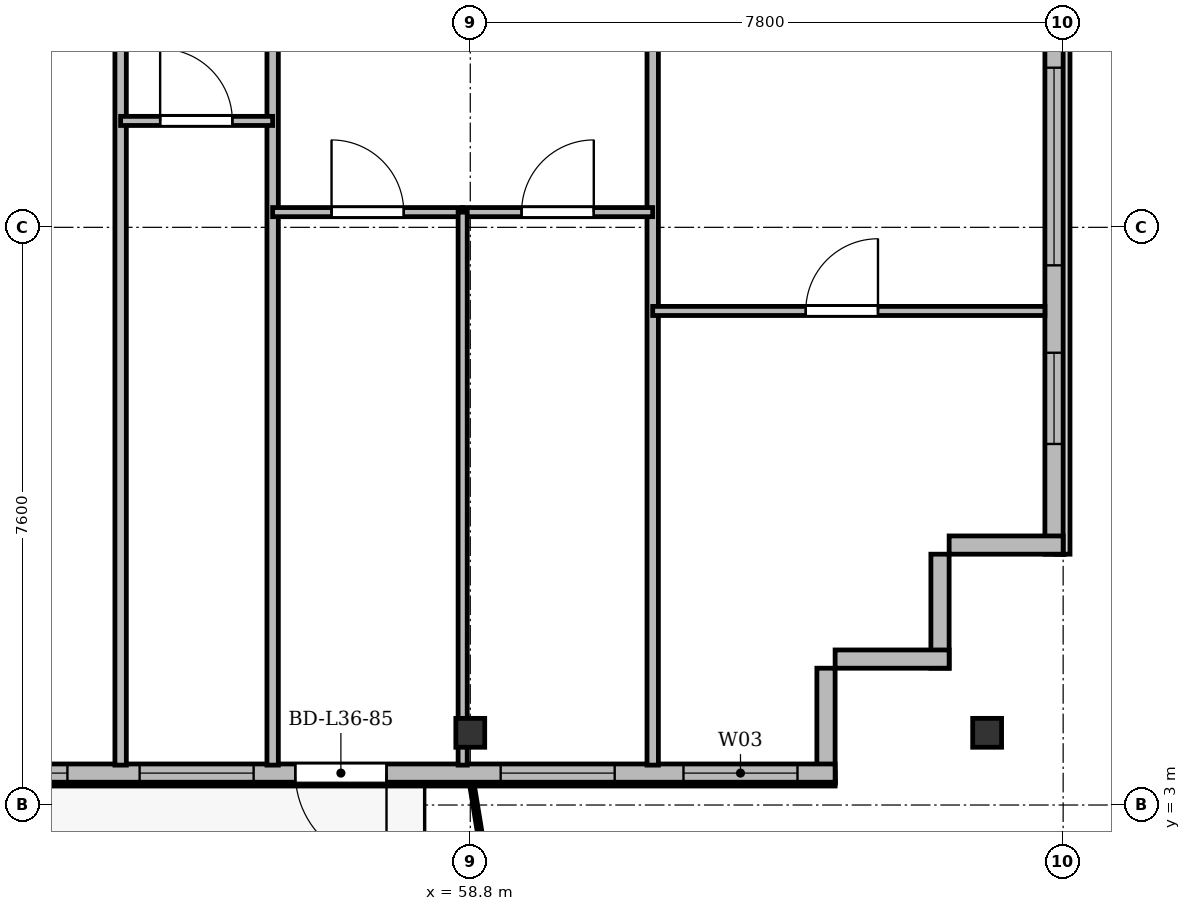
"""IFC4 building model, lengths in metres.
Left out: names, types, materials, properties, quantities, classifications, styles, units other than length and angle.
Written with IfcOpenShell. Run it as: python <this file> out.ifc"""

import sys

from ifc_helpers import new_model, si_unit, direction, frame, frame_2d, origin, origin_2d, place, context, subcontext, project, spatial, rectangle, i_section, extrude, source, transform, mapped, element, fill, save


model = new_model("IFC4")
c1 = context("Model", 3, precision=1e-05, world=origin(), true_north=direction((0.0, 1.0)))
c2 = subcontext(c1, "Body", "Model", "MODEL_VIEW")
j1 = project(units=[si_unit("LENGTHUNIT", "METRE"), si_unit("PLANEANGLEUNIT", "RADIAN")], contexts=[c1])
p1 = place(None, origin())
s1 = spatial("IfcSite", under=j1, at=p1, CompositionType="ELEMENT")
p2 = place(p1, origin())
s2 = spatial("IfcBuilding", under=s1, at=p2, CompositionType="ELEMENT")
p3 = place(p2, frame((0.0, 0.0, 139.3)))
s3 = spatial("IfcBuildingStorey", under=s2, at=p3, CompositionType="ELEMENT", Elevation=139.3)
m1 = source(origin(), c2, "Body", "SweptSolid", [
    extrude(i_section(OverallWidth=0.38, OverallDepth=0.38, WebThickness=0.02, FlangeThickness=0.03, at=origin_2d()), origin(), (0.0, 0.0, 1.0), 3.6),
])
for number, where, z_axis, x_axis in (
    (1, (58.8, 3.95, 0.0), (0.0, 0.0, 1.0), (1.0, 0.0, 0.0)),
    (2, (65.6, 3.95, 0.0), (0.0, 0.0, 1.0), (1.0, 0.0, 0.0)),
):
    element("IfcColumn", number, at=place(p3, frame(where, z_axis=z_axis, x_axis=x_axis)), inside=s3, PredefinedType="COLUMN", context=c2, shape_type="MappedRepresentation", body=[
        mapped(m1, transform((0.0, 0.0, 0.0), x_axis=(1.0, 0.0, 0.0), y_axis=(0.0, 1.0, 0.0), z_axis=(0.0, 0.0, 1.0), scale=1.0)),
    ])
p4 = place(p3, frame((66.48, 45.5, 0.0), z_axis=(0.0, 0.0, 1.0), x_axis=(0.0, -1.0, 0.0)))
e3 = element("IfcWall", 3, at=p4, inside=s3, PredefinedType="SOLIDWALL", context=c2, shape_type="SweptSolid", body=[
    extrude(rectangle(XDim=39.2, YDim=0.24, at=frame_2d((19.6, 0.0))), origin(), (0.0, 0.0, 1.0), 3.35),
])
p5 = place(p4, frame((36.55, 0.0, 0.92)))
e4 = element("IfcOpeningElement", 4, at=p5, cuts=e3, PredefinedType="OPENING", context=c2, shape_type="SweptSolid", body=[
    extrude(rectangle(XDim=1.2, YDim=1.65, at=frame_2d((0.6, 0.825))), frame((0.0, 0.13, 0.0), z_axis=(0.0, -1.0, 0.0), x_axis=(1.0, 0.0, 0.0)), (0.0, 0.0, 1.0), 0.26),
])
p6 = place(p4, frame((32.8, 0.0, 0.92)))
e5 = element("IfcOpeningElement", 5, at=p6, cuts=e3, PredefinedType="OPENING", context=c2, shape_type="SweptSolid", body=[
    extrude(rectangle(XDim=2.6, YDim=1.9, at=frame_2d((1.3, 0.95))), frame((0.0, 0.13, 0.0), z_axis=(0.0, -1.0, 0.0), x_axis=(1.0, 0.0, 0.0)), (0.0, 0.0, 1.0), 0.26),
])
p7 = place(p4, frame((28.6, 0.0, 0.92)))
e6 = element("IfcOpeningElement", 6, at=p7, cuts=e3, PredefinedType="OPENING", context=c2, shape_type="SweptSolid", body=[
    extrude(rectangle(XDim=2.6, YDim=1.9, at=frame_2d((1.3, 0.95))), frame((0.0, 0.13, 0.0), z_axis=(0.0, -1.0, 0.0), x_axis=(1.0, 0.0, 0.0)), (0.0, 0.0, 1.0), 0.26),
])
p8 = place(p4, frame((21.4, 0.0, 0.92)))
e7 = element("IfcOpeningElement", 7, at=p8, cuts=e3, PredefinedType="OPENING", context=c2, shape_type="SweptSolid", body=[
    extrude(rectangle(XDim=2.6, YDim=1.9, at=frame_2d((1.3, 0.95))), frame((0.0, 0.13, 0.0), z_axis=(0.0, -1.0, 0.0), x_axis=(1.0, 0.0, 0.0)), (0.0, 0.0, 1.0), 0.26),
])
p9 = place(p4, frame((7.4, 0.0, 0.92)))
e8 = element("IfcOpeningElement", 8, at=p9, cuts=e3, PredefinedType="OPENING", context=c2, shape_type="SweptSolid", body=[
    extrude(rectangle(XDim=2.6, YDim=1.9, at=frame_2d((1.3, 0.95))), frame((0.0, 0.13, 0.0), z_axis=(0.0, -1.0, 0.0), x_axis=(1.0, 0.0, 0.0)), (0.0, 0.0, 1.0), 0.26),
])
p10 = place(p4, frame((4.5, 0.0, 0.92)))
e9 = element("IfcOpeningElement", 9, at=p10, cuts=e3, PredefinedType="OPENING", context=c2, shape_type="SweptSolid", body=[
    extrude(rectangle(XDim=1.2, YDim=1.65, at=frame_2d((0.6, 0.825))), frame((0.0, 0.13, 0.0), z_axis=(0.0, -1.0, 0.0), x_axis=(1.0, 0.0, 0.0)), (0.0, 0.0, 1.0), 0.26),
])
p11 = place(p4, frame((1.15, 0.0, 0.92)))
e10 = element("IfcOpeningElement", 10, at=p11, cuts=e3, PredefinedType="OPENING", context=c2, shape_type="SweptSolid", body=[
    extrude(rectangle(XDim=1.2, YDim=1.65, at=frame_2d((0.6, 0.825))), frame((0.0, 0.13, 0.0), z_axis=(0.0, -1.0, 0.0), x_axis=(1.0, 0.0, 0.0)), (0.0, 0.0, 1.0), 0.26),
])
p12 = place(p3, frame((66.6, 6.42, 0.0), z_axis=(0.0, 0.0, 1.0), x_axis=(-1.0, 0.0, 0.0)))
e11 = element("IfcWall", 11, at=p12, inside=s3, PredefinedType="SOLIDWALL", context=c2, shape_type="SweptSolid", body=[
    extrude(rectangle(XDim=1.5, YDim=0.24, at=frame_2d((0.75, 0.0))), origin(), (0.0, 0.0, 1.0), 2.85),
])
for number, where, z_axis, x_axis in (
    (12, (64.98, 6.3, 0.0), (0.0, 0.0, 1.0), (0.0, -1.0, 0.0)),
    (13, (65.1, 4.92, 0.0), (0.0, 0.0, 1.0), (-1.0, 0.0, 0.0)),
):
    element("IfcWall", number, at=place(p3, frame(where, z_axis=z_axis, x_axis=x_axis)), inside=s3, PredefinedType="SOLIDWALL", context=c2, shape_type="SweptSolid", body=[
        extrude(rectangle(XDim=1.5, YDim=0.24, at=frame_2d((0.75, 0.0))), origin(), (0.0, 0.0, 1.0), 3.35),
    ])
p13 = place(p3, frame((63.48, 4.8, 0.0), z_axis=(0.0, 0.0, 1.0), x_axis=(0.0, -1.0, 0.0)))
e14 = element("IfcWall", 14, at=p13, inside=s3, PredefinedType="SOLIDWALL", context=c2, shape_type="SweptSolid", body=[
    extrude(rectangle(XDim=1.5, YDim=0.24, at=frame_2d((0.75, 0.0))), origin(), (0.0, 0.0, 1.0), 2.75),
])
p14 = place(p3, frame((63.6, 3.42, 0.0), z_axis=(0.0, 0.0, 1.0), x_axis=(-1.0, 0.0, 0.0)))
e15 = element("IfcWall", 15, at=p14, inside=s3, PredefinedType="SOLIDWALL", context=c2, shape_type="SweptSolid", body=[
    extrude(rectangle(XDim=52.8, YDim=0.24, at=frame_2d((26.4, 0.0))), origin(), (0.0, 0.0, 1.0), 3.35),
])
p15 = place(p14, frame((0.495, 0.0, 0.9)))
e16 = element("IfcOpeningElement", 16, at=p15, cuts=e15, PredefinedType="OPENING", context=c2, shape_type="SweptSolid", body=[
    extrude(rectangle(XDim=1.5, YDim=1.75, at=frame_2d((0.75, 0.875))), frame((0.0, 0.13, 0.0), z_axis=(0.0, -1.0, 0.0), x_axis=(1.0, 0.0, 0.0)), (0.0, 0.0, 1.0), 0.26),
])
p16 = place(p14, frame((2.9, 0.0, 0.9)))
e17 = element("IfcOpeningElement", 17, at=p16, cuts=e15, PredefinedType="OPENING", context=c2, shape_type="SweptSolid", body=[
    extrude(rectangle(XDim=1.5, YDim=1.75, at=frame_2d((0.75, 0.875))), frame((0.0, 0.13, 0.0), z_axis=(0.0, -1.0, 0.0), x_axis=(1.0, 0.0, 0.0)), (0.0, 0.0, 1.0), 0.26),
])
p17 = place(p14, frame((5.902, 0.0, 0.0)))
e18 = element("IfcOpeningElement", 18, at=p17, cuts=e15, PredefinedType="OPENING", context=c2, shape_type="SweptSolid", body=[
    extrude(rectangle(XDim=1.2, YDim=2.2, at=frame_2d((0.6, 1.1))), frame((0.0, 0.13, 0.0), z_axis=(0.0, -1.0, 0.0), x_axis=(1.0, 0.0, 0.0)), (0.0, 0.0, 1.0), 0.26),
])
p18 = place(p14, frame((7.65, 0.0, 0.9)))
e19 = element("IfcOpeningElement", 19, at=p18, cuts=e15, PredefinedType="OPENING", context=c2, shape_type="SweptSolid", body=[
    extrude(rectangle(XDim=1.5, YDim=1.75, at=frame_2d((0.75, 0.875))), frame((0.0, 0.13, 0.0), z_axis=(0.0, -1.0, 0.0), x_axis=(1.0, 0.0, 0.0)), (0.0, 0.0, 1.0), 0.26),
])
p19 = place(p14, frame((10.1, 0.0, 0.9)))
e20 = element("IfcOpeningElement", 20, at=p19, cuts=e15, PredefinedType="OPENING", context=c2, shape_type="SweptSolid", body=[
    extrude(rectangle(XDim=1.8, YDim=1.8, at=frame_2d((0.9, 0.9))), frame((0.0, 0.13, 0.0), z_axis=(0.0, -1.0, 0.0), x_axis=(1.0, 0.0, 0.0)), (0.0, 0.0, 1.0), 0.26),
])
p20 = place(p14, frame((13.05, 0.0, 0.9)))
e21 = element("IfcOpeningElement", 21, at=p20, cuts=e15, PredefinedType="OPENING", context=c2, shape_type="SweptSolid", body=[
    extrude(rectangle(XDim=1.5, YDim=1.75, at=frame_2d((0.75, 0.875))), frame((0.0, 0.13, 0.0), z_axis=(0.0, -1.0, 0.0), x_axis=(1.0, 0.0, 0.0)), (0.0, 0.0, 1.0), 0.26),
])
p21 = place(p14, frame((15.45, 0.0, 0.9)))
e22 = element("IfcOpeningElement", 22, at=p21, cuts=e15, PredefinedType="OPENING", context=c2, shape_type="SweptSolid", body=[
    extrude(rectangle(XDim=1.5, YDim=1.75, at=frame_2d((0.75, 0.875))), frame((0.0, 0.13, 0.0), z_axis=(0.0, -1.0, 0.0), x_axis=(1.0, 0.0, 0.0)), (0.0, 0.0, 1.0), 0.26),
])
p22 = place(p14, frame((17.6, 0.0, 0.9)))
e23 = element("IfcOpeningElement", 23, at=p22, cuts=e15, PredefinedType="OPENING", context=c2, shape_type="SweptSolid", body=[
    extrude(rectangle(XDim=2.0, YDim=1.95, at=frame_2d((1.0, 0.975))), frame((0.0, 0.13, 0.0), z_axis=(0.0, -1.0, 0.0), x_axis=(1.0, 0.0, 0.0)), (0.0, 0.0, 1.0), 0.26),
])
p23 = place(p14, frame((20.625, 0.0, 0.9)))
e24 = element("IfcOpeningElement", 24, at=p23, cuts=e15, PredefinedType="OPENING", context=c2, shape_type="SweptSolid", body=[
    extrude(rectangle(XDim=1.65, YDim=1.85, at=frame_2d((0.825, 0.925))), frame((0.0, 0.13, 0.0), z_axis=(0.0, -1.0, 0.0), x_axis=(1.0, 0.0, 0.0)), (0.0, 0.0, 1.0), 0.26),
])
p24 = place(p14, frame((23.85, 0.0, 0.9)))
e25 = element("IfcOpeningElement", 25, at=p24, cuts=e15, PredefinedType="OPENING", context=c2, shape_type="SweptSolid", body=[
    extrude(rectangle(XDim=1.8, YDim=1.8, at=frame_2d((0.9, 0.9))), frame((0.0, 0.13, 0.0), z_axis=(0.0, -1.0, 0.0), x_axis=(1.0, 0.0, 0.0)), (0.0, 0.0, 1.0), 0.26),
])
p25 = place(p14, frame((28.6, 0.0, 0.9)))
e26 = element("IfcOpeningElement", 26, at=p25, cuts=e15, PredefinedType="OPENING", context=c2, shape_type="SweptSolid", body=[
    extrude(rectangle(XDim=2.2, YDim=1.8, at=frame_2d((1.1, 0.9))), frame((0.0, 0.13, 0.0), z_axis=(0.0, -1.0, 0.0), x_axis=(1.0, 0.0, 0.0)), (0.0, 0.0, 1.0), 0.26),
])
p26 = place(p14, frame((34.478, 0.0, 0.0)))
e27 = element("IfcOpeningElement", 27, at=p26, cuts=e15, PredefinedType="OPENING", context=c2, shape_type="SweptSolid", body=[
    extrude(rectangle(XDim=1.2, YDim=2.2, at=frame_2d((0.6, 1.1))), frame((0.0, 0.13, 0.0), z_axis=(0.0, -1.0, 0.0), x_axis=(1.0, 0.0, 0.0)), (0.0, 0.0, 1.0), 0.26),
])
p27 = place(p14, frame((37.4, 0.0, 0.9)))
e28 = element("IfcOpeningElement", 28, at=p27, cuts=e15, PredefinedType="OPENING", context=c2, shape_type="SweptSolid", body=[
    extrude(rectangle(XDim=2.0, YDim=1.95, at=frame_2d((1.0, 0.975))), frame((0.0, 0.13, 0.0), z_axis=(0.0, -1.0, 0.0), x_axis=(1.0, 0.0, 0.0)), (0.0, 0.0, 1.0), 0.26),
])
p28 = place(p14, frame((40.975, 0.0, 0.9)))
e29 = element("IfcOpeningElement", 29, at=p28, cuts=e15, PredefinedType="OPENING", context=c2, shape_type="SweptSolid", body=[
    extrude(rectangle(XDim=1.65, YDim=1.85, at=frame_2d((0.825, 0.925))), frame((0.0, 0.13, 0.0), z_axis=(0.0, -1.0, 0.0), x_axis=(1.0, 0.0, 0.0)), (0.0, 0.0, 1.0), 0.26),
])
p29 = place(p14, frame((43.65, 0.0, 0.9)))
e30 = element("IfcOpeningElement", 30, at=p29, cuts=e15, PredefinedType="OPENING", context=c2, shape_type="SweptSolid", body=[
    extrude(rectangle(XDim=1.5, YDim=1.75, at=frame_2d((0.75, 0.875))), frame((0.0, 0.13, 0.0), z_axis=(0.0, -1.0, 0.0), x_axis=(1.0, 0.0, 0.0)), (0.0, 0.0, 1.0), 0.26),
])
p30 = place(p14, frame((45.85, 0.0, 0.9)))
e31 = element("IfcOpeningElement", 31, at=p30, cuts=e15, PredefinedType="OPENING", context=c2, shape_type="SweptSolid", body=[
    extrude(rectangle(XDim=1.5, YDim=1.75, at=frame_2d((0.75, 0.875))), frame((0.0, 0.13, 0.0), z_axis=(0.0, -1.0, 0.0), x_axis=(1.0, 0.0, 0.0)), (0.0, 0.0, 1.0), 0.26),
])
p31 = place(p14, frame((48.25, 0.0, 0.9)))
e32 = element("IfcOpeningElement", 32, at=p31, cuts=e15, PredefinedType="OPENING", context=c2, shape_type="SweptSolid", body=[
    extrude(rectangle(XDim=1.5, YDim=1.75, at=frame_2d((0.75, 0.875))), frame((0.0, 0.13, 0.0), z_axis=(0.0, -1.0, 0.0), x_axis=(1.0, 0.0, 0.0)), (0.0, 0.0, 1.0), 0.26),
])
p32 = place(p14, frame((50.455, 0.0, 0.9)))
e33 = element("IfcOpeningElement", 33, at=p32, cuts=e15, PredefinedType="OPENING", context=c2, shape_type="SweptSolid", body=[
    extrude(rectangle(XDim=2.0, YDim=1.95, at=frame_2d((1.0, 0.975))), frame((0.0, 0.13, 0.0), z_axis=(0.0, -1.0, 0.0), x_axis=(1.0, 0.0, 0.0)), (0.0, 0.0, 1.0), 0.26),
])
for number, where, z_axis, x_axis in (
    (34, (61.2, 3.525, 0.0), (0.0, 0.0, 1.0), (0.0, 1.0, 0.0)),
    (35, (54.2, 3.525, 0.0), (0.0, 0.0, 1.0), (0.0, 1.0, 0.0)),
    (36, (56.2, 3.525, 0.0), (0.0, 0.0, 1.0), (0.0, 1.0, 0.0)),
):
    element("IfcWall", number, at=place(p3, frame(where, z_axis=z_axis, x_axis=x_axis)), inside=s3, PredefinedType="PARTITIONING", context=c2, shape_type="SweptSolid", body=[
        extrude(rectangle(XDim=27.275, YDim=0.15, at=frame_2d((13.638, 0.0))), origin(), (0.0, 0.0, 1.0), 2.75),
    ])
p33 = place(p3, frame((54.2, 12.0, 0.0), z_axis=(0.0, 0.0, 1.0), x_axis=(1.0, 0.0, 0.0)))
e37 = element("IfcWall", 37, at=p33, inside=s3, PredefinedType="PARTITIONING", context=c2, shape_type="SweptSolid", body=[
    extrude(rectangle(XDim=2.0, YDim=0.12, at=frame_2d((1.0, 0.0))), origin(), (0.0, 0.0, 1.0), 3.35),
])
p34 = place(p33, frame((0.52, 0.0, 0.0)))
e38 = element("IfcOpeningElement", 38, at=p34, cuts=e37, PredefinedType="OPENING", context=c2, shape_type="SweptSolid", body=[
    extrude(rectangle(XDim=0.95, YDim=2.15, at=frame_2d((0.475, 1.075))), frame((0.0, 0.07, 0.0), z_axis=(0.0, -1.0, 0.0), x_axis=(1.0, 0.0, 0.0)), (0.0, 0.0, 1.0), 0.14),
])
p35 = place(p3, frame((56.2, 10.8, 0.0), z_axis=(0.0, 0.0, 1.0), x_axis=(1.0, 0.0, 0.0)))
e39 = element("IfcWall", 39, at=p35, inside=s3, PredefinedType="PARTITIONING", context=c2, shape_type="SweptSolid", body=[
    extrude(rectangle(XDim=2.5, YDim=0.12, at=frame_2d((1.25, 0.0))), origin(), (0.0, 0.0, 1.0), 3.0),
])
p36 = place(p35, frame((0.775, 0.0, 0.0)))
e40 = element("IfcOpeningElement", 40, at=p36, cuts=e39, PredefinedType="OPENING", context=c2, shape_type="SweptSolid", body=[
    extrude(rectangle(XDim=0.95, YDim=2.15, at=frame_2d((0.475, 1.075))), frame((0.0, 0.07, 0.0), z_axis=(0.0, -1.0, 0.0), x_axis=(1.0, 0.0, 0.0)), (0.0, 0.0, 1.0), 0.14),
])
p37 = place(p3, frame((58.7, 10.8, 0.0), z_axis=(0.0, 0.0, 1.0), x_axis=(1.0, 0.0, 0.0)))
e41 = element("IfcWall", 41, at=p37, inside=s3, PredefinedType="PARTITIONING", context=c2, shape_type="SweptSolid", body=[
    extrude(rectangle(XDim=2.5, YDim=0.12, at=frame_2d((1.25, 0.0))), origin(), (0.0, 0.0, 1.0), 2.85),
])
p38 = place(p37, frame((0.775, 0.0, 0.0)))
e42 = element("IfcOpeningElement", 42, at=p38, cuts=e41, PredefinedType="OPENING", context=c2, shape_type="SweptSolid", body=[
    extrude(rectangle(XDim=0.95, YDim=2.15, at=frame_2d((0.475, 1.075))), frame((0.0, 0.07, 0.0), z_axis=(0.0, -1.0, 0.0), x_axis=(1.0, 0.0, 0.0)), (0.0, 0.0, 1.0), 0.14),
])
p39 = place(p3, frame((58.7, 3.525, 0.0), z_axis=(0.0, 0.0, 1.0), x_axis=(0.0, 1.0, 0.0)))
e43 = element("IfcWall", 43, at=p39, inside=s3, PredefinedType="PARTITIONING", context=c2, shape_type="SweptSolid", body=[
    extrude(rectangle(XDim=7.275, YDim=0.12, at=frame_2d((3.638, 0.0))), origin(), (0.0, 0.0, 1.0), 2.75),
])
p40 = place(p3, frame((61.2, 9.5, 0.0), z_axis=(0.0, 0.0, 1.0), x_axis=(1.0, 0.0, 0.0)))
e44 = element("IfcWall", 44, at=p40, inside=s3, PredefinedType="PARTITIONING", context=c2, shape_type="SweptSolid", body=[
    extrude(rectangle(XDim=5.16, YDim=0.12, at=frame_2d((2.58, 0.0))), origin(), (0.0, 0.0, 1.0), 2.85),
])
p41 = place(p40, frame((2.014, 0.0, 0.0)))
e45 = element("IfcOpeningElement", 45, at=p41, cuts=e44, PredefinedType="OPENING", context=c2, shape_type="SweptSolid", body=[
    extrude(rectangle(XDim=0.95, YDim=2.15, at=frame_2d((0.475, 1.075))), frame((0.0, 0.07, 0.0), z_axis=(0.0, -1.0, 0.0), x_axis=(1.0, 0.0, 0.0)), (0.0, 0.0, 1.0), 0.14),
])
m2 = source(origin(), c2, "Body", "SweptSolid", [
    extrude(rectangle(XDim=1.2, YDim=1.65, at=frame_2d((0.6, 0.825))), frame((0.0, 0.03, 0.0), z_axis=(0.0, -1.0, 0.0), x_axis=(1.0, 0.0, 0.0)), (0.0, 0.0, 1.0), 0.06),
])
p42 = place(p5, origin())
e46 = element("IfcWindow", 46, at=p42, inside=s3, PartitioningType="SINGLE_PANEL", PredefinedType="WINDOW", context=c2, shape_type="MappedRepresentation", body=[
    mapped(m2, transform((0.0, 0.0, 0.0), x_axis=(1.0, 0.0, 0.0), y_axis=(0.0, 1.0, 0.0), z_axis=(0.0, 0.0, 1.0), scale=1.0)),
])
fill(e4, e46)
m3 = source(origin(), c2, "Body", "SweptSolid", [
    extrude(rectangle(XDim=2.6, YDim=1.9, at=frame_2d((1.3, 0.95))), frame((0.0, 0.03, 0.0), z_axis=(0.0, -1.0, 0.0), x_axis=(1.0, 0.0, 0.0)), (0.0, 0.0, 1.0), 0.06),
])
p43 = place(p6, origin())
e47 = element("IfcWindow", 47, at=p43, inside=s3, PartitioningType="SINGLE_PANEL", PredefinedType="WINDOW", context=c2, shape_type="MappedRepresentation", body=[
    mapped(m3, transform((0.0, 0.0, 0.0), x_axis=(1.0, 0.0, 0.0), y_axis=(0.0, 1.0, 0.0), z_axis=(0.0, 0.0, 1.0), scale=1.0)),
])
fill(e5, e47)
m4 = source(origin(), c2, "Body", "SweptSolid", [
    extrude(rectangle(XDim=1.5, YDim=1.75, at=frame_2d((0.75, 0.875))), frame((0.0, 0.03, 0.0), z_axis=(0.0, -1.0, 0.0), x_axis=(1.0, 0.0, 0.0)), (0.0, 0.0, 1.0), 0.06),
])
p44 = place(p15, origin())
e48 = element("IfcWindow", 48, at=p44, inside=s3, PartitioningType="SINGLE_PANEL", PredefinedType="WINDOW", context=c2, shape_type="MappedRepresentation", body=[
    mapped(m4, transform((0.0, 0.0, 0.0), x_axis=(1.0, 0.0, 0.0), y_axis=(0.0, 1.0, 0.0), z_axis=(0.0, 0.0, 1.0), scale=1.0)),
])
fill(e16, e48)
p45 = place(p16, origin())
e49 = element("IfcWindow", 49, at=p45, inside=s3, PartitioningType="SINGLE_PANEL", PredefinedType="WINDOW", context=c2, shape_type="MappedRepresentation", body=[
    mapped(m4, transform((0.0, 0.0, 0.0), x_axis=(1.0, 0.0, 0.0), y_axis=(0.0, 1.0, 0.0), z_axis=(0.0, 0.0, 1.0), scale=1.0)),
])
fill(e17, e49)
m5 = source(origin(), c2, "Body", "SweptSolid", [
    extrude(rectangle(XDim=1.2, YDim=2.2, at=frame_2d((0.6, 1.1))), frame((0.0, 0.025, 0.0), z_axis=(0.0, -1.0, 0.0), x_axis=(1.0, 0.0, 0.0)), (0.0, 0.0, 1.0), 0.05),
])
p46 = place(p17, origin())
e50 = element("IfcDoor", 50, at=p46, inside=s3, OperationType="SINGLE_SWING_LEFT", PredefinedType="DOOR", context=c2, shape_type="MappedRepresentation", body=[
    mapped(m5, transform((0.0, 0.0, 0.0), x_axis=(1.0, 0.0, 0.0), y_axis=(0.0, 1.0, 0.0), z_axis=(0.0, 0.0, 1.0), scale=1.0)),
])
fill(e18, e50)
p47 = place(p18, origin())
e51 = element("IfcWindow", 51, at=p47, inside=s3, PartitioningType="SINGLE_PANEL", PredefinedType="WINDOW", context=c2, shape_type="MappedRepresentation", body=[
    mapped(m4, transform((0.0, 0.0, 0.0), x_axis=(1.0, 0.0, 0.0), y_axis=(0.0, 1.0, 0.0), z_axis=(0.0, 0.0, 1.0), scale=1.0)),
])
fill(e19, e51)
m6 = source(origin(), c2, "Body", "SweptSolid", [
    extrude(rectangle(XDim=1.8, YDim=1.8, at=frame_2d((0.9, 0.9))), frame((0.0, 0.03, 0.0), z_axis=(0.0, -1.0, 0.0), x_axis=(1.0, 0.0, 0.0)), (0.0, 0.0, 1.0), 0.06),
])
p48 = place(p19, origin())
e52 = element("IfcWindow", 52, at=p48, inside=s3, PartitioningType="SINGLE_PANEL", PredefinedType="WINDOW", context=c2, shape_type="MappedRepresentation", body=[
    mapped(m6, transform((0.0, 0.0, 0.0), x_axis=(1.0, 0.0, 0.0), y_axis=(0.0, 1.0, 0.0), z_axis=(0.0, 0.0, 1.0), scale=1.0)),
])
fill(e20, e52)
m7 = source(origin(), c2, "Body", "SweptSolid", [
    extrude(rectangle(XDim=0.95, YDim=2.15, at=frame_2d((0.475, 1.075))), frame((0.0, 0.025, 0.0), z_axis=(0.0, -1.0, 0.0), x_axis=(1.0, 0.0, 0.0)), (0.0, 0.0, 1.0), 0.05),
])
p49 = place(p34, origin())
e53 = element("IfcDoor", 53, at=p49, inside=s3, OperationType="SINGLE_SWING_LEFT", PredefinedType="DOOR", context=c2, shape_type="MappedRepresentation", body=[
    mapped(m7, transform((0.0, 0.0, 0.0), x_axis=(1.0, 0.0, 0.0), y_axis=(0.0, 1.0, 0.0), z_axis=(0.0, 0.0, 1.0), scale=1.0)),
])
fill(e38, e53)
p50 = place(p36, origin())
e54 = element("IfcDoor", 54, at=p50, inside=s3, OperationType="SINGLE_SWING_LEFT", PredefinedType="DOOR", context=c2, shape_type="MappedRepresentation", body=[
    mapped(m7, transform((0.0, 0.0, 0.0), x_axis=(1.0, 0.0, 0.0), y_axis=(0.0, 1.0, 0.0), z_axis=(0.0, 0.0, 1.0), scale=1.0)),
])
fill(e40, e54)
p51 = place(p38, origin())
e55 = element("IfcDoor", 55, at=p51, inside=s3, OperationType="SINGLE_SWING_RIGHT", PredefinedType="DOOR", context=c2, shape_type="MappedRepresentation", body=[
    mapped(m7, transform((0.0, 0.0, 0.0), x_axis=(1.0, 0.0, 0.0), y_axis=(0.0, 1.0, 0.0), z_axis=(0.0, 0.0, 1.0), scale=1.0)),
])
fill(e42, e55)
p52 = place(p41, origin())
e56 = element("IfcDoor", 56, at=p52, inside=s3, OperationType="SINGLE_SWING_RIGHT", PredefinedType="DOOR", context=c2, shape_type="MappedRepresentation", body=[
    mapped(m7, transform((0.0, 0.0, 0.0), x_axis=(1.0, 0.0, 0.0), y_axis=(0.0, 1.0, 0.0), z_axis=(0.0, 0.0, 1.0), scale=1.0)),
])
fill(e45, e56)
save(model, sys.argv[1])
